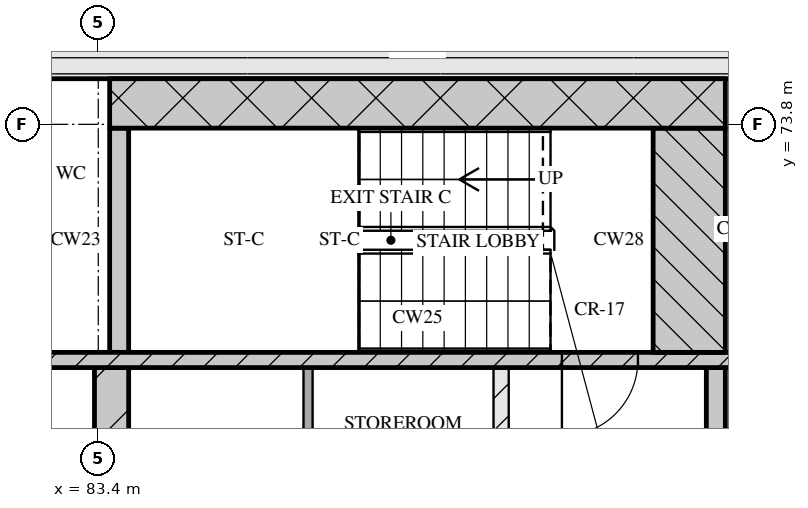
"""IFC4 building model, lengths in metres.
Left out: names, types, materials, properties, quantities, classifications, styles, units other than length and angle.
Written with IfcOpenShell. Run it as: python <this file> out.ifc"""

import sys

from ifc_helpers import new_model, si_unit, direction, frame, frame_2d, origin, place, context, subcontext, project, spatial, rectangle, extrude, element, fill, save


model = new_model("IFC4")
c1 = context("Model", 3, precision=1e-05, world=origin(), true_north=direction((0.0, 1.0)))
c2 = subcontext(c1, "Body", "Model", "MODEL_VIEW")
j1 = project(units=[si_unit("LENGTHUNIT", "METRE"), si_unit("PLANEANGLEUNIT", "RADIAN")], contexts=[c1])
p1 = place(None, origin())
s1 = spatial("IfcSite", under=j1, at=p1, CompositionType="ELEMENT")
p2 = place(p1, origin())
s2 = spatial("IfcBuilding", under=s1, at=p2, CompositionType="ELEMENT")
p3 = place(p2, frame((0.0, 0.0, 263.55)))
s3 = spatial("IfcBuildingStorey", under=s2, at=p3, CompositionType="ELEMENT", Elevation=263.55)
p4 = place(p3, frame((67.3, 74.65, 0.0), z_axis=(0.0, 0.0, 1.0), x_axis=(1.0, 0.0, 0.0)))
e1 = element("IfcWall", 1, at=p4, inside=s3, PredefinedType="SOLIDWALL", context=c2, shape_type="SweptSolid", body=[
    extrude(rectangle(XDim=40.6, YDim=0.5, at=frame_2d((20.3, 0.0))), origin(), (0.0, 0.0, 1.0), 3.32),
])
p5 = place(p3, frame((83.575, 68.0, 0.0), z_axis=(0.0, 0.0, 1.0), x_axis=(0.0, 1.0, 0.0)))
e2 = element("IfcWall", 2, at=p5, inside=s3, PredefinedType="SOLIDWALL", context=c2, shape_type="SweptSolid", body=[
    extrude(rectangle(XDim=2.6, YDim=0.45, at=frame_2d((1.3, 0.0))), origin(), (0.0, 0.0, 1.0), 3.32),
])
p6 = place(p3, frame((86.16, 68.0, 0.0), z_axis=(0.0, 0.0, 1.0), x_axis=(0.0, 1.0, 0.0)))
e3 = element("IfcWall", 3, at=p6, inside=s3, PredefinedType="PARTITIONING", context=c2, shape_type="SweptSolid", body=[
    extrude(rectangle(XDim=2.6, YDim=0.12, at=frame_2d((1.3, 0.0))), origin(), (0.0, 0.0, 1.0), 3.32),
])
p7 = place(p3, frame((88.7, 68.0, 0.0), z_axis=(0.0, 0.0, 1.0), x_axis=(0.0, 1.0, 0.0)))
e4 = element("IfcWall", 4, at=p7, inside=s3, PredefinedType="PARTITIONING", context=c2, shape_type="SweptSolid", body=[
    extrude(rectangle(XDim=2.6, YDim=0.2, at=frame_2d((1.3, 0.0))), origin(), (0.0, 0.0, 1.0), 3.32),
])
p8 = place(p3, frame((91.525, 68.0, 0.0), z_axis=(0.0, 0.0, 1.0), x_axis=(0.0, 1.0, 0.0)))
e5 = element("IfcWall", 5, at=p8, inside=s3, PredefinedType="SOLIDWALL", context=c2, shape_type="SweptSolid", body=[
    extrude(rectangle(XDim=2.6, YDim=0.25, at=frame_2d((1.3, 0.0))), origin(), (0.0, 0.0, 1.0), 3.32),
])
p9 = place(p3, frame((67.8, 70.7, 0.0), z_axis=(0.0, 0.0, 1.0), x_axis=(1.0, 0.0, 0.0)))
e6 = element("IfcWall", 6, at=p9, inside=s3, PredefinedType="SOLIDWALL", context=c2, shape_type="SweptSolid", body=[
    extrude(rectangle(XDim=39.6, YDim=0.2, at=frame_2d((19.8, 0.0))), origin(), (0.0, 0.0, 1.0), 3.32),
])
p10 = place(p9, frame((0.65, 0.0, 0.0)))
e7 = element("IfcOpeningElement", 7, at=p10, cuts=e6, PredefinedType="OPENING", context=c2, shape_type="SweptSolid", body=[
    extrude(rectangle(XDim=1.1, YDim=2.1, at=frame_2d((0.55, 1.05))), frame((0.0, 0.11, 0.0), z_axis=(0.0, -1.0, 0.0), x_axis=(1.0, 0.0, 0.0)), (0.0, 0.0, 1.0), 0.22),
])
p11 = place(p9, frame((3.25, 0.0, 0.0)))
e8 = element("IfcOpeningElement", 8, at=p11, cuts=e6, PredefinedType="OPENING", context=c2, shape_type="SweptSolid", body=[
    extrude(rectangle(XDim=1.1, YDim=2.1, at=frame_2d((0.55, 1.05))), frame((0.0, 0.11, 0.0), z_axis=(0.0, -1.0, 0.0), x_axis=(1.0, 0.0, 0.0)), (0.0, 0.0, 1.0), 0.22),
])
p12 = place(p9, frame((5.9, 0.0, 0.0)))
e9 = element("IfcOpeningElement", 9, at=p12, cuts=e6, PredefinedType="OPENING", context=c2, shape_type="SweptSolid", body=[
    extrude(rectangle(XDim=1.0, YDim=2.1, at=frame_2d((0.5, 1.05))), frame((0.0, 0.11, 0.0), z_axis=(0.0, -1.0, 0.0), x_axis=(1.0, 0.0, 0.0)), (0.0, 0.0, 1.0), 0.22),
])
p13 = place(p9, frame((21.7, 0.0, 0.0)))
e10 = element("IfcOpeningElement", 10, at=p13, cuts=e6, PredefinedType="OPENING", context=c2, shape_type="SweptSolid", body=[
    extrude(rectangle(XDim=1.0, YDim=2.1, at=frame_2d((0.5, 1.05))), frame((0.0, 0.11, 0.0), z_axis=(0.0, -1.0, 0.0), x_axis=(1.0, 0.0, 0.0)), (0.0, 0.0, 1.0), 0.22),
])
p14 = place(p9, frame((32.7, 0.0, 0.0)))
e11 = element("IfcOpeningElement", 11, at=p14, cuts=e6, PredefinedType="OPENING", context=c2, shape_type="SweptSolid", body=[
    extrude(rectangle(XDim=1.0, YDim=2.1, at=frame_2d((0.5, 1.05))), frame((0.0, 0.11, 0.0), z_axis=(0.0, -1.0, 0.0), x_axis=(1.0, 0.0, 0.0)), (0.0, 0.0, 1.0), 0.22),
])
p15 = place(p9, frame((35.25, 0.0, 0.0)))
e12 = element("IfcOpeningElement", 12, at=p15, cuts=e6, PredefinedType="OPENING", context=c2, shape_type="SweptSolid", body=[
    extrude(rectangle(XDim=1.1, YDim=2.1, at=frame_2d((0.55, 1.05))), frame((0.0, 0.11, 0.0), z_axis=(0.0, -1.0, 0.0), x_axis=(1.0, 0.0, 0.0)), (0.0, 0.0, 1.0), 0.22),
])
p16 = place(p9, frame((37.85, 0.0, 0.0)))
e13 = element("IfcOpeningElement", 13, at=p16, cuts=e6, PredefinedType="OPENING", context=c2, shape_type="SweptSolid", body=[
    extrude(rectangle(XDim=1.1, YDim=2.1, at=frame_2d((0.55, 1.05))), frame((0.0, 0.11, 0.0), z_axis=(0.0, -1.0, 0.0), x_axis=(1.0, 0.0, 0.0)), (0.0, 0.0, 1.0), 0.22),
])
p17 = place(p3, frame((83.675, 70.8, 0.0), z_axis=(0.0, 0.0, 1.0), x_axis=(0.0, 1.0, 0.0)))
e14 = element("IfcWall", 14, at=p17, inside=s3, PredefinedType="SOLIDWALL", context=c2, shape_type="SweptSolid", body=[
    extrude(rectangle(XDim=2.95, YDim=0.25, at=frame_2d((1.475, 0.0))), origin(), (0.0, 0.0, 1.0), 3.32),
])
p18 = place(p3, frame((91.175, 70.8, 0.0), z_axis=(0.0, 0.0, 1.0), x_axis=(0.0, 1.0, 0.0)))
e15 = element("IfcWall", 15, at=p18, inside=s3, PredefinedType="SOLIDWALL", context=c2, shape_type="SweptSolid", body=[
    extrude(rectangle(XDim=2.95, YDim=0.95, at=frame_2d((1.475, 0.0))), origin(), (0.0, 0.0, 1.0), 3.32),
])
p19 = place(p3, frame((83.55, 74.075, 0.0), z_axis=(0.0, 0.0, 1.0), x_axis=(1.0, 0.0, 0.0)))
e16 = element("IfcWall", 16, at=p19, inside=s3, PredefinedType="SOLIDWALL", context=c2, shape_type="SweptSolid", body=[
    extrude(rectangle(XDim=8.1, YDim=0.65, at=frame_2d((4.05, 0.0))), origin(), (0.0, 0.0, 1.0), 3.32),
])
p20 = place(p13, origin())
e17 = element("IfcDoor", 17, at=p20, inside=s3, OperationType="SINGLE_SWING_RIGHT", PredefinedType="DOOR", context=c2, shape_type="SweptSolid", body=[
    extrude(rectangle(XDim=1.0, YDim=2.1, at=frame_2d((0.5, 1.05))), frame((0.0, 0.025, 0.0), z_axis=(0.0, -1.0, 0.0), x_axis=(1.0, 0.0, 0.0)), (0.0, 0.0, 1.0), 0.05),
])
fill(e10, e17)
save(model, sys.argv[1])
